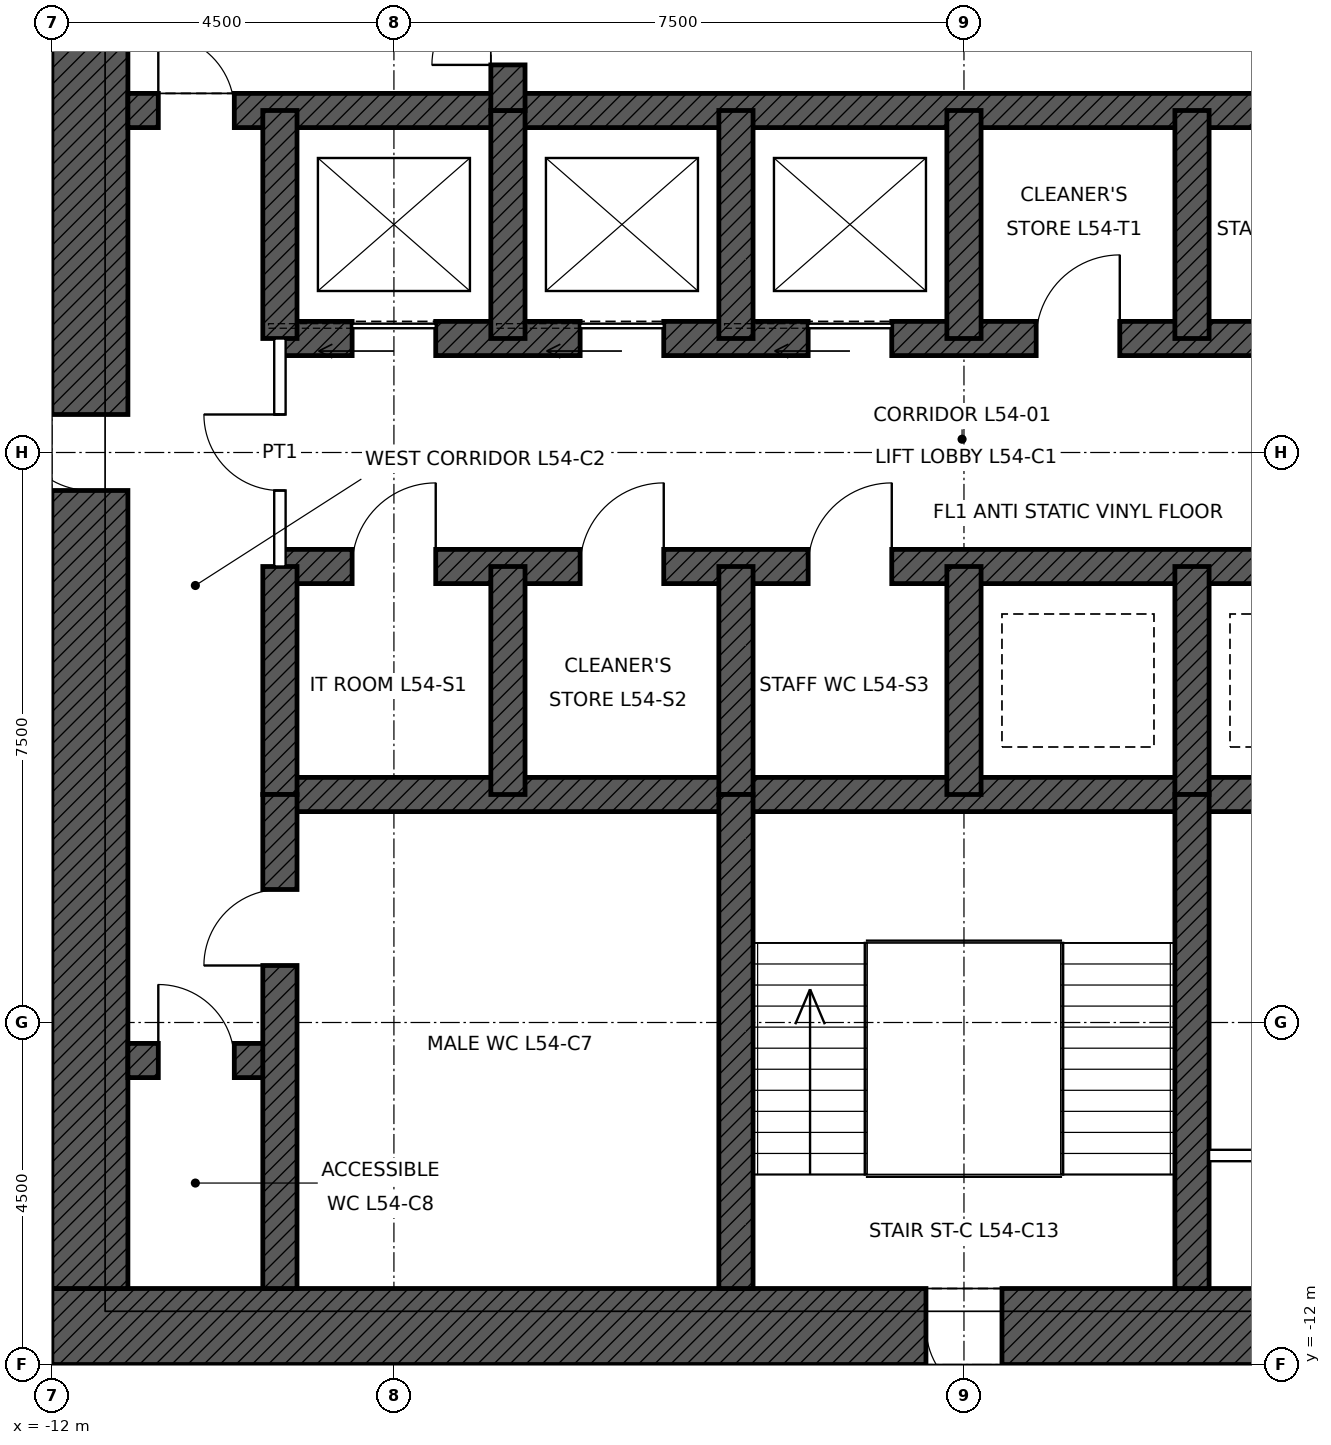
"""IFC4 building model, lengths in metres.
Left out: names, types, materials, properties, quantities, classifications, styles, units other than length and angle.
Written with IfcOpenShell. Run it as: python <this file> out.ifc"""

import sys

from ifc_helpers import new_model, si_unit, direction, frame, frame_2d, origin, place, context, subcontext, project, spatial, rectangle, extrude, element, fill, save


model = new_model("IFC4")
c1 = context("Model", 3, precision=1e-05, world=origin(), true_north=direction((0.0, 1.0)))
c2 = subcontext(c1, "Body", "Model", "MODEL_VIEW")
j1 = project(units=[si_unit("LENGTHUNIT", "METRE"), si_unit("PLANEANGLEUNIT", "RADIAN")], contexts=[c1])
p1 = place(None, origin())
s1 = spatial("IfcSite", under=j1, at=p1, CompositionType="ELEMENT")
p2 = place(p1, origin())
s2 = spatial("IfcBuilding", under=s1, at=p2, CompositionType="ELEMENT")
p3 = place(p2, frame((0.0, 0.0, 249.9)))
s3 = spatial("IfcBuildingStorey", under=s2, at=p3, CompositionType="ELEMENT", Elevation=249.9)
p4 = place(p3, frame((12.0, -11.5, 0.0), z_axis=(0.0, 0.0, 1.0), x_axis=(-1.0, 0.0, 0.0)))
e1 = element("IfcWall", 1, at=p4, inside=s3, PredefinedType="SHEAR", context=c2, shape_type="SweptSolid", body=[
    extrude(rectangle(XDim=24.0, YDim=1.0, at=frame_2d((12.0, 0.0))), origin(), (0.0, 0.0, 1.0), 4.0),
])
p5 = place(p4, frame((11.5, 0.0, 0.0)))
e2 = element("IfcOpeningElement", 2, at=p5, cuts=e1, PredefinedType="OPENING", context=c2, shape_type="SweptSolid", body=[
    extrude(rectangle(XDim=1.0, YDim=2.1, at=frame_2d((0.5, 1.05))), frame((0.0, 0.51, 0.0), z_axis=(0.0, -1.0, 0.0), x_axis=(1.0, 0.0, 0.0)), (0.0, 0.0, 1.0), 1.02),
])
p6 = place(p4, frame((1.0, 0.0, 0.0)))
e3 = element("IfcOpeningElement", 3, at=p6, cuts=e1, PredefinedType="OPENING", context=c2, shape_type="SweptSolid", body=[
    extrude(rectangle(XDim=1.0, YDim=2.4, at=frame_2d((0.5, 1.2))), frame((0.0, 0.51, 0.0), z_axis=(0.0, -1.0, 0.0), x_axis=(1.0, 0.0, 0.0)), (0.0, 0.0, 1.0), 1.02),
])
p7 = place(p3, frame((-11.5, -11.0, 0.0), z_axis=(0.0, 0.0, 1.0), x_axis=(0.0, 1.0, 0.0)))
e4 = element("IfcWall", 4, at=p7, inside=s3, PredefinedType="SHEAR", context=c2, shape_type="SweptSolid", body=[
    extrude(rectangle(XDim=22.0, YDim=1.0, at=frame_2d((11.0, 0.0))), origin(), (0.0, 0.0, 1.0), 4.0),
])
p8 = place(p7, frame((10.5, 0.0, 0.0)))
e5 = element("IfcOpeningElement", 5, at=p8, cuts=e4, PredefinedType="OPENING", context=c2, shape_type="SweptSolid", body=[
    extrude(rectangle(XDim=1.0, YDim=2.4, at=frame_2d((0.5, 1.2))), frame((0.0, 0.51, 0.0), z_axis=(0.0, -1.0, 0.0), x_axis=(1.0, 0.0, 0.0)), (0.0, 0.0, 1.0), 1.02),
])
p9 = place(p3, frame((-11.0, 4.5, 0.0), z_axis=(0.0, 0.0, 1.0), x_axis=(1.0, 0.0, 0.0)))
e6 = element("IfcWall", 6, at=p9, inside=s3, PredefinedType="SHEAR", context=c2, shape_type="SweptSolid", body=[
    extrude(rectangle(XDim=22.0, YDim=0.45, at=frame_2d((11.0, 0.0))), origin(), (0.0, 0.0, 1.0), 4.0),
])
p10 = place(p9, frame((0.4, 0.0, 0.0)))
e7 = element("IfcOpeningElement", 7, at=p10, cuts=e6, PredefinedType="OPENING", context=c2, shape_type="SweptSolid", body=[
    extrude(rectangle(XDim=1.0, YDim=2.1, at=frame_2d((0.5, 1.05))), frame((0.0, 0.235, 0.0), z_axis=(0.0, -1.0, 0.0), x_axis=(1.0, 0.0, 0.0)), (0.0, 0.0, 1.0), 0.47),
])
p11 = place(p9, frame((20.6, 0.0, 0.0)))
e8 = element("IfcOpeningElement", 8, at=p11, cuts=e6, PredefinedType="OPENING", context=c2, shape_type="SweptSolid", body=[
    extrude(rectangle(XDim=1.0, YDim=2.1, at=frame_2d((0.5, 1.05))), frame((0.0, 0.235, 0.0), z_axis=(0.0, -1.0, 0.0), x_axis=(1.0, 0.0, 0.0)), (0.0, 0.0, 1.0), 0.47),
])
p12 = place(p3, frame((-9.0, 1.5, 0.0), z_axis=(0.0, 0.0, 1.0), x_axis=(1.0, 0.0, 0.0)))
e9 = element("IfcWall", 9, at=p12, inside=s3, PredefinedType="SHEAR", context=c2, shape_type="SweptSolid", body=[
    extrude(rectangle(XDim=18.0, YDim=0.45, at=frame_2d((9.0, 0.0))), origin(), (0.0, 0.0, 1.0), 4.0),
])
p13 = place(p12, frame((0.95, 0.0, 0.0)))
e10 = element("IfcOpeningElement", 10, at=p13, cuts=e9, PredefinedType="OPENING", context=c2, shape_type="SweptSolid", body=[
    extrude(rectangle(XDim=1.1, YDim=2.1, at=frame_2d((0.55, 1.05))), frame((0.0, 0.235, 0.0), z_axis=(0.0, -1.0, 0.0), x_axis=(1.0, 0.0, 0.0)), (0.0, 0.0, 1.0), 0.47),
])
p14 = place(p12, frame((3.95, 0.0, 0.0)))
e11 = element("IfcOpeningElement", 11, at=p14, cuts=e9, PredefinedType="OPENING", context=c2, shape_type="SweptSolid", body=[
    extrude(rectangle(XDim=1.1, YDim=2.1, at=frame_2d((0.55, 1.05))), frame((0.0, 0.235, 0.0), z_axis=(0.0, -1.0, 0.0), x_axis=(1.0, 0.0, 0.0)), (0.0, 0.0, 1.0), 0.47),
])
p15 = place(p12, frame((6.95, 0.0, 0.0)))
e12 = element("IfcOpeningElement", 12, at=p15, cuts=e9, PredefinedType="OPENING", context=c2, shape_type="SweptSolid", body=[
    extrude(rectangle(XDim=1.1, YDim=2.1, at=frame_2d((0.55, 1.05))), frame((0.0, 0.235, 0.0), z_axis=(0.0, -1.0, 0.0), x_axis=(1.0, 0.0, 0.0)), (0.0, 0.0, 1.0), 0.47),
])
p16 = place(p12, frame((9.95, 0.0, 0.0)))
e13 = element("IfcOpeningElement", 13, at=p16, cuts=e9, PredefinedType="OPENING", context=c2, shape_type="SweptSolid", body=[
    extrude(rectangle(XDim=1.1, YDim=2.1, at=frame_2d((0.55, 1.05))), frame((0.0, 0.235, 0.0), z_axis=(0.0, -1.0, 0.0), x_axis=(1.0, 0.0, 0.0)), (0.0, 0.0, 1.0), 0.47),
])
p17 = place(p12, frame((12.95, 0.0, 0.0)))
e14 = element("IfcOpeningElement", 14, at=p17, cuts=e9, PredefinedType="OPENING", context=c2, shape_type="SweptSolid", body=[
    extrude(rectangle(XDim=1.1, YDim=2.1, at=frame_2d((0.55, 1.05))), frame((0.0, 0.235, 0.0), z_axis=(0.0, -1.0, 0.0), x_axis=(1.0, 0.0, 0.0)), (0.0, 0.0, 1.0), 0.47),
])
p18 = place(p12, frame((15.95, 0.0, 0.0)))
e15 = element("IfcOpeningElement", 15, at=p18, cuts=e9, PredefinedType="OPENING", context=c2, shape_type="SweptSolid", body=[
    extrude(rectangle(XDim=1.1, YDim=2.1, at=frame_2d((0.55, 1.05))), frame((0.0, 0.235, 0.0), z_axis=(0.0, -1.0, 0.0), x_axis=(1.0, 0.0, 0.0)), (0.0, 0.0, 1.0), 0.47),
])
p19 = place(p3, frame((-9.0, -1.5, 0.0), z_axis=(0.0, 0.0, 1.0), x_axis=(1.0, 0.0, 0.0)))
e16 = element("IfcWall", 16, at=p19, inside=s3, PredefinedType="SHEAR", context=c2, shape_type="SweptSolid", body=[
    extrude(rectangle(XDim=18.0, YDim=0.45, at=frame_2d((9.0, 0.0))), origin(), (0.0, 0.0, 1.0), 4.0),
])
p20 = place(p19, frame((0.95, 0.0, 0.0)))
e17 = element("IfcOpeningElement", 17, at=p20, cuts=e16, PredefinedType="OPENING", context=c2, shape_type="SweptSolid", body=[
    extrude(rectangle(XDim=1.1, YDim=2.1, at=frame_2d((0.55, 1.05))), frame((0.0, 0.235, 0.0), z_axis=(0.0, -1.0, 0.0), x_axis=(1.0, 0.0, 0.0)), (0.0, 0.0, 1.0), 0.47),
])
p21 = place(p19, frame((3.95, 0.0, 0.0)))
e18 = element("IfcOpeningElement", 18, at=p21, cuts=e16, PredefinedType="OPENING", context=c2, shape_type="SweptSolid", body=[
    extrude(rectangle(XDim=1.1, YDim=2.1, at=frame_2d((0.55, 1.05))), frame((0.0, 0.235, 0.0), z_axis=(0.0, -1.0, 0.0), x_axis=(1.0, 0.0, 0.0)), (0.0, 0.0, 1.0), 0.47),
])
p22 = place(p19, frame((6.95, 0.0, 0.0)))
e19 = element("IfcOpeningElement", 19, at=p22, cuts=e16, PredefinedType="OPENING", context=c2, shape_type="SweptSolid", body=[
    extrude(rectangle(XDim=1.1, YDim=2.1, at=frame_2d((0.55, 1.05))), frame((0.0, 0.235, 0.0), z_axis=(0.0, -1.0, 0.0), x_axis=(1.0, 0.0, 0.0)), (0.0, 0.0, 1.0), 0.47),
])
p23 = place(p3, frame((-9.0, -4.5, 0.0), z_axis=(0.0, 0.0, 1.0), x_axis=(1.0, 0.0, 0.0)))
e20 = element("IfcWall", 20, at=p23, inside=s3, PredefinedType="SHEAR", context=c2, shape_type="SweptSolid", body=[
    extrude(rectangle(XDim=18.0, YDim=0.45, at=frame_2d((9.0, 0.0))), origin(), (0.0, 0.0, 1.0), 4.0),
])
p24 = place(p3, frame((-11.0, -8.0, 0.0), z_axis=(0.0, 0.0, 1.0), x_axis=(1.0, 0.0, 0.0)))
e21 = element("IfcWall", 21, at=p24, inside=s3, PredefinedType="SHEAR", context=c2, shape_type="SweptSolid", body=[
    extrude(rectangle(XDim=2.0, YDim=0.45, at=frame_2d((1.0, 0.0))), origin(), (0.0, 0.0, 1.0), 4.0),
])
p25 = place(p24, frame((0.4, 0.0, 0.0)))
e22 = element("IfcOpeningElement", 22, at=p25, cuts=e21, PredefinedType="OPENING", context=c2, shape_type="SweptSolid", body=[
    extrude(rectangle(XDim=1.0, YDim=2.1, at=frame_2d((0.5, 1.05))), frame((0.0, 0.235, 0.0), z_axis=(0.0, -1.0, 0.0), x_axis=(1.0, 0.0, 0.0)), (0.0, 0.0, 1.0), 0.47),
])
for number, where, z_axis, x_axis in (
    (23, (-9.0, 1.5, 0.0), (0.0, 0.0, 1.0), (0.0, 1.0, 0.0)),
    (24, (-9.0, -4.5, 0.0), (0.0, 0.0, 1.0), (0.0, 1.0, 0.0)),
    (25, (-6.0, 1.5, 0.0), (0.0, 0.0, 1.0), (0.0, 1.0, 0.0)),
    (26, (-3.0, 1.5, 0.0), (0.0, 0.0, 1.0), (0.0, 1.0, 0.0)),
    (27, (0.0, 1.5, 0.0), (0.0, 0.0, 1.0), (0.0, 1.0, 0.0)),
    (28, (3.0, 1.5, 0.0), (0.0, 0.0, 1.0), (0.0, 1.0, 0.0)),
    (29, (-6.0, -4.5, 0.0), (0.0, 0.0, 1.0), (0.0, 1.0, 0.0)),
    (30, (-3.0, -4.5, 0.0), (0.0, 0.0, 1.0), (0.0, 1.0, 0.0)),
    (31, (0.0, -4.5, 0.0), (0.0, 0.0, 1.0), (0.0, 1.0, 0.0)),
    (32, (3.0, -4.5, 0.0), (0.0, 0.0, 1.0), (0.0, 1.0, 0.0)),
):
    element("IfcWall", number, at=place(p3, frame(where, z_axis=z_axis, x_axis=x_axis)), inside=s3, PredefinedType="SHEAR", context=c2, shape_type="SweptSolid", body=[
        extrude(rectangle(XDim=3.0, YDim=0.45, at=frame_2d((1.5, 0.0))), origin(), (0.0, 0.0, 1.0), 4.0),
    ])
p26 = place(p3, frame((-6.0, 4.5, 0.0), z_axis=(0.0, 0.0, 1.0), x_axis=(0.0, 1.0, 0.0)))
e33 = element("IfcWall", 33, at=p26, inside=s3, PredefinedType="SHEAR", context=c2, shape_type="SweptSolid", body=[
    extrude(rectangle(XDim=6.5, YDim=0.45, at=frame_2d((3.25, 0.0))), origin(), (0.0, 0.0, 1.0), 4.0),
])
p27 = place(p26, frame((0.6, 0.0, 0.0)))
e34 = element("IfcOpeningElement", 34, at=p27, cuts=e33, PredefinedType="OPENING", context=c2, shape_type="SweptSolid", body=[
    extrude(rectangle(XDim=1.0, YDim=2.1, at=frame_2d((0.5, 1.05))), frame((0.0, 0.235, 0.0), z_axis=(0.0, -1.0, 0.0), x_axis=(1.0, 0.0, 0.0)), (0.0, 0.0, 1.0), 0.47),
])
p28 = place(p3, frame((-9.0, -11.0, 0.0), z_axis=(0.0, 0.0, 1.0), x_axis=(0.0, 1.0, 0.0)))
e35 = element("IfcWall", 35, at=p28, inside=s3, PredefinedType="SHEAR", context=c2, shape_type="SweptSolid", body=[
    extrude(rectangle(XDim=6.5, YDim=0.45, at=frame_2d((3.25, 0.0))), origin(), (0.0, 0.0, 1.0), 4.0),
])
p29 = place(p28, frame((4.25, 0.0, 0.0)))
e36 = element("IfcOpeningElement", 36, at=p29, cuts=e35, PredefinedType="OPENING", context=c2, shape_type="SweptSolid", body=[
    extrude(rectangle(XDim=1.0, YDim=2.1, at=frame_2d((0.5, 1.05))), frame((0.0, 0.235, 0.0), z_axis=(0.0, -1.0, 0.0), x_axis=(1.0, 0.0, 0.0)), (0.0, 0.0, 1.0), 0.47),
])
for number, where, z_axis, x_axis in (
    (37, (-3.0, -11.0, 0.0), (0.0, 0.0, 1.0), (0.0, 1.0, 0.0)),
    (38, (3.0, -11.0, 0.0), (0.0, 0.0, 1.0), (0.0, 1.0, 0.0)),
):
    element("IfcWall", number, at=place(p3, frame(where, z_axis=z_axis, x_axis=x_axis)), inside=s3, PredefinedType="SHEAR", context=c2, shape_type="SweptSolid", body=[
        extrude(rectangle(XDim=6.5, YDim=0.45, at=frame_2d((3.25, 0.0))), origin(), (0.0, 0.0, 1.0), 4.0),
    ])
p30 = place(p3, frame((3.225, -9.25, 0.0), z_axis=(0.0, 0.0, 1.0), x_axis=(1.0, 0.0, 0.0)))
e39 = element("IfcWall", 39, at=p30, inside=s3, PredefinedType="PARTITIONING", context=c2, shape_type="SweptSolid", body=[
    extrude(rectangle(XDim=5.55, YDim=0.15, at=frame_2d((2.775, 0.0))), origin(), (0.0, 0.0, 1.0), 3.75),
])
p31 = place(p30, frame((2.275, 0.0, 0.0)))
e40 = element("IfcOpeningElement", 40, at=p31, cuts=e39, PredefinedType="OPENING", context=c2, shape_type="SweptSolid", body=[
    extrude(rectangle(XDim=1.0, YDim=2.1, at=frame_2d((0.5, 1.05))), frame((0.0, 0.085, 0.0), z_axis=(0.0, -1.0, 0.0), x_axis=(1.0, 0.0, 0.0)), (0.0, 0.0, 1.0), 0.17),
])
p32 = place(p3, frame((-9.0, -1.5, 0.0), z_axis=(0.0, 0.0, 1.0), x_axis=(0.0, 1.0, 0.0)))
e41 = element("IfcWall", 41, at=p32, inside=s3, PredefinedType="PARTITIONING", context=c2, shape_type="SweptSolid", body=[
    extrude(rectangle(XDim=3.0, YDim=0.15, at=frame_2d((1.5, 0.0))), origin(), (0.0, 0.0, 1.0), 3.75),
])
p33 = place(p32, frame((1.0, 0.0, 0.0)))
e42 = element("IfcOpeningElement", 42, at=p33, cuts=e41, PredefinedType="OPENING", context=c2, shape_type="SweptSolid", body=[
    extrude(rectangle(XDim=1.0, YDim=2.4, at=frame_2d((0.5, 1.2))), frame((0.0, 0.085, 0.0), z_axis=(0.0, -1.0, 0.0), x_axis=(1.0, 0.0, 0.0)), (0.0, 0.0, 1.0), 0.17),
])
p34 = place(p10, origin())
e43 = element("IfcDoor", 43, at=p34, inside=s3, OperationType="SINGLE_SWING_LEFT", PredefinedType="DOOR", context=c2, shape_type="SweptSolid", body=[
    extrude(rectangle(XDim=1.0, YDim=2.1, at=frame_2d((0.5, 1.05))), frame((0.0, 0.025, 0.0), z_axis=(0.0, -1.0, 0.0), x_axis=(1.0, 0.0, 0.0)), (0.0, 0.0, 1.0), 0.05),
])
fill(e7, e43)
p35 = place(p27, origin())
e44 = element("IfcDoor", 44, at=p35, inside=s3, OperationType="SINGLE_SWING_LEFT", PredefinedType="DOOR", context=c2, shape_type="SweptSolid", body=[
    extrude(rectangle(XDim=1.0, YDim=2.1, at=frame_2d((0.5, 1.05))), frame((0.0, 0.025, 0.0), z_axis=(0.0, -1.0, 0.0), x_axis=(1.0, 0.0, 0.0)), (0.0, 0.0, 1.0), 0.05),
])
fill(e34, e44)
p36 = place(p5, origin())
e45 = element("IfcDoor", 45, at=p36, inside=s3, OperationType="SINGLE_SWING_LEFT", PredefinedType="DOOR", context=c2, shape_type="SweptSolid", body=[
    extrude(rectangle(XDim=1.0, YDim=2.1, at=frame_2d((0.5, 1.05))), frame((0.0, 0.485, 0.0), z_axis=(0.0, -1.0, 0.0), x_axis=(1.0, 0.0, 0.0)), (0.0, 0.0, 1.0), 0.05),
])
fill(e2, e45)
p37 = place(p8, origin())
e46 = element("IfcDoor", 46, at=p37, inside=s3, OperationType="SINGLE_SWING_RIGHT", PredefinedType="DOOR", context=c2, shape_type="SweptSolid", body=[
    extrude(rectangle(XDim=1.0, YDim=2.4, at=frame_2d((0.5, 1.2))), frame((0.0, 0.485, 0.0), z_axis=(0.0, -1.0, 0.0), x_axis=(1.0, 0.0, 0.0)), (0.0, 0.0, 1.0), 0.05),
])
fill(e5, e46)
p38 = place(p29, origin())
e47 = element("IfcDoor", 47, at=p38, inside=s3, OperationType="SINGLE_SWING_LEFT", PredefinedType="DOOR", context=c2, shape_type="SweptSolid", body=[
    extrude(rectangle(XDim=1.0, YDim=2.1, at=frame_2d((0.5, 1.05))), frame((0.0, 0.025, 0.0), z_axis=(0.0, -1.0, 0.0), x_axis=(1.0, 0.0, 0.0)), (0.0, 0.0, 1.0), 0.05),
])
fill(e36, e47)
p39 = place(p25, origin())
e48 = element("IfcDoor", 48, at=p39, inside=s3, OperationType="SINGLE_SWING_LEFT", PredefinedType="DOOR", context=c2, shape_type="SweptSolid", body=[
    extrude(rectangle(XDim=1.0, YDim=2.1, at=frame_2d((0.5, 1.05))), frame((0.0, 0.025, 0.0), z_axis=(0.0, -1.0, 0.0), x_axis=(1.0, 0.0, 0.0)), (0.0, 0.0, 1.0), 0.05),
])
fill(e22, e48)
p40 = place(p13, origin())
e49 = element("IfcDoor", 49, at=p40, inside=s3, OperationType="SLIDING_TO_LEFT", PredefinedType="DOOR", context=c2, shape_type="SweptSolid", body=[
    extrude(rectangle(XDim=1.1, YDim=2.1, at=frame_2d((0.55, 1.05))), frame((0.0, 0.025, 0.0), z_axis=(0.0, -1.0, 0.0), x_axis=(1.0, 0.0, 0.0)), (0.0, 0.0, 1.0), 0.05),
])
fill(e10, e49)
p41 = place(p14, origin())
e50 = element("IfcDoor", 50, at=p41, inside=s3, OperationType="SLIDING_TO_LEFT", PredefinedType="DOOR", context=c2, shape_type="SweptSolid", body=[
    extrude(rectangle(XDim=1.1, YDim=2.1, at=frame_2d((0.55, 1.05))), frame((0.0, 0.025, 0.0), z_axis=(0.0, -1.0, 0.0), x_axis=(1.0, 0.0, 0.0)), (0.0, 0.0, 1.0), 0.05),
])
fill(e11, e50)
p42 = place(p15, origin())
e51 = element("IfcDoor", 51, at=p42, inside=s3, OperationType="SLIDING_TO_LEFT", PredefinedType="DOOR", context=c2, shape_type="SweptSolid", body=[
    extrude(rectangle(XDim=1.1, YDim=2.1, at=frame_2d((0.55, 1.05))), frame((0.0, 0.025, 0.0), z_axis=(0.0, -1.0, 0.0), x_axis=(1.0, 0.0, 0.0)), (0.0, 0.0, 1.0), 0.05),
])
fill(e12, e51)
p43 = place(p33, origin())
e52 = element("IfcDoor", 52, at=p43, inside=s3, OperationType="SINGLE_SWING_RIGHT", PredefinedType="DOOR", context=c2, shape_type="SweptSolid", body=[
    extrude(rectangle(XDim=1.0, YDim=2.4, at=frame_2d((0.5, 1.2))), frame((0.0, 0.025, 0.0), z_axis=(0.0, -1.0, 0.0), x_axis=(1.0, 0.0, 0.0)), (0.0, 0.0, 1.0), 0.05),
])
fill(e42, e52)
p44 = place(p16, origin())
e53 = element("IfcDoor", 53, at=p44, inside=s3, OperationType="SINGLE_SWING_RIGHT", PredefinedType="DOOR", context=c2, shape_type="SweptSolid", body=[
    extrude(rectangle(XDim=1.1, YDim=2.1, at=frame_2d((0.55, 1.05))), frame((0.0, 0.025, 0.0), z_axis=(0.0, -1.0, 0.0), x_axis=(1.0, 0.0, 0.0)), (0.0, 0.0, 1.0), 0.05),
])
fill(e13, e53)
p45 = place(p20, origin())
e54 = element("IfcDoor", 54, at=p45, inside=s3, OperationType="SINGLE_SWING_RIGHT", PredefinedType="DOOR", context=c2, shape_type="SweptSolid", body=[
    extrude(rectangle(XDim=1.1, YDim=2.1, at=frame_2d((0.55, 1.05))), frame((0.0, 0.025, 0.0), z_axis=(0.0, -1.0, 0.0), x_axis=(1.0, 0.0, 0.0)), (0.0, 0.0, 1.0), 0.05),
])
fill(e17, e54)
p46 = place(p21, origin())
e55 = element("IfcDoor", 55, at=p46, inside=s3, OperationType="SINGLE_SWING_RIGHT", PredefinedType="DOOR", context=c2, shape_type="SweptSolid", body=[
    extrude(rectangle(XDim=1.1, YDim=2.1, at=frame_2d((0.55, 1.05))), frame((0.0, 0.025, 0.0), z_axis=(0.0, -1.0, 0.0), x_axis=(1.0, 0.0, 0.0)), (0.0, 0.0, 1.0), 0.05),
])
fill(e18, e55)
p47 = place(p22, origin())
e56 = element("IfcDoor", 56, at=p47, inside=s3, OperationType="SINGLE_SWING_RIGHT", PredefinedType="DOOR", context=c2, shape_type="SweptSolid", body=[
    extrude(rectangle(XDim=1.1, YDim=2.1, at=frame_2d((0.55, 1.05))), frame((0.0, 0.025, 0.0), z_axis=(0.0, -1.0, 0.0), x_axis=(1.0, 0.0, 0.0)), (0.0, 0.0, 1.0), 0.05),
])
fill(e19, e56)
save(model, sys.argv[1])
